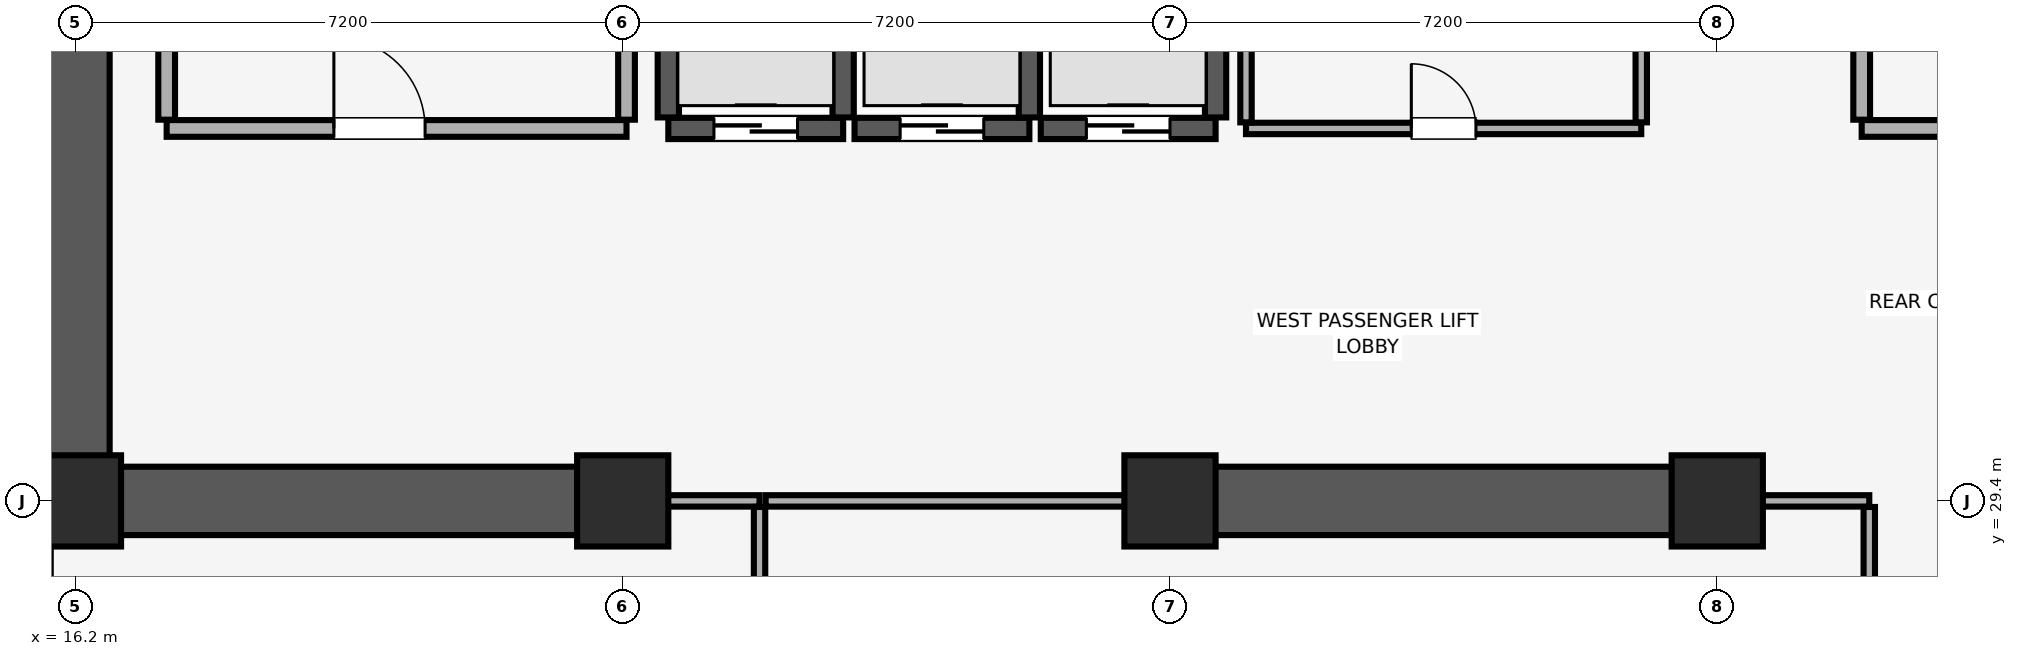
"""IFC4 building model, lengths in metres.
Left out: names, types, materials, properties, quantities, classifications, styles, units other than length and angle.
Written with IfcOpenShell. Run it as: python <this file> out.ifc"""

import sys

from ifc_helpers import new_model, si_unit, direction, frame, frame_2d, origin, origin_2d, place, context, subcontext, project, spatial, rectangle, extrude, element, fill, save


model = new_model("IFC4")
c1 = context("Model", 3, precision=1e-05, world=origin(), true_north=direction((0.0, 1.0)))
c2 = subcontext(c1, "Body", "Model", "MODEL_VIEW")
j1 = project(units=[si_unit("LENGTHUNIT", "METRE"), si_unit("PLANEANGLEUNIT", "RADIAN")], contexts=[c1])
p1 = place(None, origin())
s1 = spatial("IfcSite", under=j1, at=p1, CompositionType="ELEMENT")
p2 = place(p1, origin())
s2 = spatial("IfcBuilding", under=s1, at=p2, CompositionType="ELEMENT")
p3 = place(p2, frame((0.0, 0.0, 126.8)))
s3 = spatial("IfcBuildingStorey", under=s2, at=p3, CompositionType="ELEMENT", Elevation=126.8)
for number, where, z_axis, x_axis in (
    (1, (16.2, 29.4, 0.0), (0.0, 0.0, 1.0), (1.0, 0.0, 0.0)),
    (2, (23.4, 29.4, 0.0), (0.0, 0.0, 1.0), (1.0, 0.0, 0.0)),
    (3, (30.6, 29.4, 0.0), (0.0, 0.0, 1.0), (1.0, 0.0, 0.0)),
    (4, (37.8, 29.4, 0.0), (0.0, 0.0, 1.0), (1.0, 0.0, 0.0)),
):
    element("IfcColumn", number, at=place(p3, frame(where, z_axis=z_axis, x_axis=x_axis)), inside=s3, PredefinedType="COLUMN", context=c2, shape_type="SweptSolid", body=[
        extrude(rectangle(XDim=1.2, YDim=1.2, at=origin_2d()), origin(), (0.0, 0.0, 1.0), 3.51),
    ])
p4 = place(p3, frame((16.2, 29.4, 0.0), z_axis=(0.0, 0.0, 1.0), x_axis=(0.0, 1.0, 0.0)))
e5 = element("IfcWall", 5, at=p4, inside=s3, PredefinedType="SHEAR", context=c2, shape_type="SweptSolid", body=[
    extrude(rectangle(XDim=19.2, YDim=0.9, at=frame_2d((9.6, 0.0))), origin(), (0.0, 0.0, 1.0), 3.51),
])
p5 = place(p3, frame((16.655, 29.4, 0.0), z_axis=(0.0, 0.0, 1.0), x_axis=(1.0, 0.0, 0.0)))
e6 = element("IfcWall", 6, at=p5, inside=s3, PredefinedType="SHEAR", context=c2, shape_type="SweptSolid", body=[
    extrude(rectangle(XDim=6.945, YDim=0.9, at=frame_2d((3.473, 0.0))), origin(), (0.0, 0.0, 1.0), 3.51),
])
p6 = place(p3, frame((30.4, 29.4, 0.0), z_axis=(0.0, 0.0, 1.0), x_axis=(1.0, 0.0, 0.0)))
e7 = element("IfcWall", 7, at=p6, inside=s3, PredefinedType="SHEAR", context=c2, shape_type="SweptSolid", body=[
    extrude(rectangle(XDim=7.6, YDim=0.9, at=frame_2d((3.8, 0.0))), origin(), (0.0, 0.0, 1.0), 3.51),
])
p7 = place(p3, frame((24.0, 34.3, 0.0), z_axis=(0.0, 0.0, 1.0), x_axis=(1.0, 0.0, 0.0)))
e8 = element("IfcWall", 8, at=p7, inside=s3, PredefinedType="SHEAR", context=c2, shape_type="SweptSolid", body=[
    extrude(rectangle(XDim=2.3, YDim=0.28, at=frame_2d((1.15, 0.0))), origin(), (0.0, 0.0, 1.0), 3.51),
])
p8 = place(p7, frame((0.6, 0.0, 0.0)))
e9 = element("IfcOpeningElement", 9, at=p8, cuts=e8, PredefinedType="OPENING", context=c2, shape_type="SweptSolid", body=[
    extrude(rectangle(XDim=1.1, YDim=2.2, at=frame_2d((0.55, 1.1))), frame((0.0, 0.15, 0.0), z_axis=(0.0, -1.0, 0.0), x_axis=(1.0, 0.0, 0.0)), (0.0, 0.0, 1.0), 0.3),
])
for number, where, z_axis, x_axis in (
    (10, (24.0, 34.445, 0.0), (0.0, 0.0, 1.0), (0.0, 1.0, 0.0)),
    (11, (26.3, 34.445, 0.0), (0.0, 0.0, 1.0), (0.0, 1.0, 0.0)),
):
    element("IfcWall", number, at=place(p3, frame(where, z_axis=z_axis, x_axis=x_axis)), inside=s3, PredefinedType="SHEAR", context=c2, shape_type="SweptSolid", body=[
        extrude(rectangle(XDim=2.01, YDim=0.28, at=frame_2d((1.005, 0.0))), origin(), (0.0, 0.0, 1.0), 3.51),
    ])
p9 = place(p3, frame((26.45, 34.3, 0.0), z_axis=(0.0, 0.0, 1.0), x_axis=(1.0, 0.0, 0.0)))
e12 = element("IfcWall", 12, at=p9, inside=s3, PredefinedType="SHEAR", context=c2, shape_type="SweptSolid", body=[
    extrude(rectangle(XDim=2.3, YDim=0.28, at=frame_2d((1.15, 0.0))), origin(), (0.0, 0.0, 1.0), 3.51),
])
p10 = place(p9, frame((0.6, 0.0, 0.0)))
e13 = element("IfcOpeningElement", 13, at=p10, cuts=e12, PredefinedType="OPENING", context=c2, shape_type="SweptSolid", body=[
    extrude(rectangle(XDim=1.1, YDim=2.2, at=frame_2d((0.55, 1.1))), frame((0.0, 0.15, 0.0), z_axis=(0.0, -1.0, 0.0), x_axis=(1.0, 0.0, 0.0)), (0.0, 0.0, 1.0), 0.3),
])
p11 = place(p3, frame((28.75, 34.445, 0.0), z_axis=(0.0, 0.0, 1.0), x_axis=(0.0, 1.0, 0.0)))
e14 = element("IfcWall", 14, at=p11, inside=s3, PredefinedType="SHEAR", context=c2, shape_type="SweptSolid", body=[
    extrude(rectangle(XDim=2.01, YDim=0.28, at=frame_2d((1.005, 0.0))), origin(), (0.0, 0.0, 1.0), 3.51),
])
p12 = place(p3, frame((28.9, 34.3, 0.0), z_axis=(0.0, 0.0, 1.0), x_axis=(1.0, 0.0, 0.0)))
e15 = element("IfcWall", 15, at=p12, inside=s3, PredefinedType="SHEAR", context=c2, shape_type="SweptSolid", body=[
    extrude(rectangle(XDim=2.3, YDim=0.28, at=frame_2d((1.15, 0.0))), origin(), (0.0, 0.0, 1.0), 3.51),
])
p13 = place(p12, frame((0.6, 0.0, 0.0)))
e16 = element("IfcOpeningElement", 16, at=p13, cuts=e15, PredefinedType="OPENING", context=c2, shape_type="SweptSolid", body=[
    extrude(rectangle(XDim=1.1, YDim=2.2, at=frame_2d((0.55, 1.1))), frame((0.0, 0.15, 0.0), z_axis=(0.0, -1.0, 0.0), x_axis=(1.0, 0.0, 0.0)), (0.0, 0.0, 1.0), 0.3),
])
p14 = place(p3, frame((31.2, 34.445, 0.0), z_axis=(0.0, 0.0, 1.0), x_axis=(0.0, 1.0, 0.0)))
e17 = element("IfcWall", 17, at=p14, inside=s3, PredefinedType="SHEAR", context=c2, shape_type="SweptSolid", body=[
    extrude(rectangle(XDim=2.01, YDim=0.28, at=frame_2d((1.005, 0.0))), origin(), (0.0, 0.0, 1.0), 3.51),
])
p15 = place(p3, frame((17.4, 34.3, 0.0), z_axis=(0.0, 0.0, 1.0), x_axis=(1.0, 0.0, 0.0)))
e18 = element("IfcWall", 18, at=p15, inside=s3, PredefinedType="PARTITIONING", context=c2, shape_type="SweptSolid", body=[
    extrude(rectangle(XDim=6.05, YDim=0.22, at=frame_2d((3.025, 0.0))), origin(), (0.0, 0.0, 1.0), 3.51),
])
p16 = place(p15, frame((2.2, 0.0, 0.0)))
e19 = element("IfcOpeningElement", 19, at=p16, cuts=e18, PredefinedType="OPENING", context=c2, shape_type="SweptSolid", body=[
    extrude(rectangle(XDim=1.2, YDim=2.15, at=frame_2d((0.6, 1.075))), frame((0.0, 0.12, 0.0), z_axis=(0.0, -1.0, 0.0), x_axis=(1.0, 0.0, 0.0)), (0.0, 0.0, 1.0), 0.24),
])
p17 = place(p3, frame((17.4, 34.415, 0.0), z_axis=(0.0, 0.0, 1.0), x_axis=(0.0, 1.0, 0.0)))
e20 = element("IfcWall", 20, at=p17, inside=s3, PredefinedType="PARTITIONING", context=c2, shape_type="SweptSolid", body=[
    extrude(rectangle(XDim=5.43, YDim=0.22, at=frame_2d((2.715, 0.0))), origin(), (0.0, 0.0, 1.0), 3.51),
])
p18 = place(p3, frame((23.45, 34.415, 0.0), z_axis=(0.0, 0.0, 1.0), x_axis=(0.0, 1.0, 0.0)))
e21 = element("IfcWall", 21, at=p18, inside=s3, PredefinedType="PARTITIONING", context=c2, shape_type="SweptSolid", body=[
    extrude(rectangle(XDim=5.64, YDim=0.22, at=frame_2d((2.82, 0.0))), origin(), (0.0, 0.0, 1.0), 3.51),
])
p19 = place(p3, frame((39.7, 34.3, 0.0), z_axis=(0.0, 0.0, 1.0), x_axis=(1.0, 0.0, 0.0)))
e22 = element("IfcWall", 22, at=p19, inside=s3, PredefinedType="PARTITIONING", context=c2, shape_type="SweptSolid", body=[
    extrude(rectangle(XDim=4.6, YDim=0.22, at=frame_2d((2.3, 0.0))), origin(), (0.0, 0.0, 1.0), 3.51),
])
p20 = place(p19, frame((1.7, 0.0, 0.0)))
e23 = element("IfcOpeningElement", 23, at=p20, cuts=e22, PredefinedType="OPENING", context=c2, shape_type="SweptSolid", body=[
    extrude(rectangle(XDim=1.2, YDim=2.15, at=frame_2d((0.6, 1.075))), frame((0.0, 0.12, 0.0), z_axis=(0.0, -1.0, 0.0), x_axis=(1.0, 0.0, 0.0)), (0.0, 0.0, 1.0), 0.24),
])
p21 = place(p3, frame((39.7, 34.415, 0.0), z_axis=(0.0, 0.0, 1.0), x_axis=(0.0, 1.0, 0.0)))
e24 = element("IfcWall", 24, at=p21, inside=s3, PredefinedType="PARTITIONING", context=c2, shape_type="SweptSolid", body=[
    extrude(rectangle(XDim=5.785, YDim=0.22, at=frame_2d((2.893, 0.0))), origin(), (0.0, 0.0, 1.0), 3.51),
])
p22 = place(p3, frame((31.6, 34.3, 0.0), z_axis=(0.0, 0.0, 1.0), x_axis=(1.0, 0.0, 0.0)))
e25 = element("IfcWall", 25, at=p22, inside=s3, PredefinedType="PARTITIONING", context=c2, shape_type="SweptSolid", body=[
    extrude(rectangle(XDim=5.2, YDim=0.15, at=frame_2d((2.6, 0.0))), origin(), (0.0, 0.0, 1.0), 3.51),
])
p23 = place(p22, frame((2.175, 0.0, 0.0)))
e26 = element("IfcOpeningElement", 26, at=p23, cuts=e25, PredefinedType="OPENING", context=c2, shape_type="SweptSolid", body=[
    extrude(rectangle(XDim=0.85, YDim=2.1, at=frame_2d((0.425, 1.05))), frame((0.0, 0.085, 0.0), z_axis=(0.0, -1.0, 0.0), x_axis=(1.0, 0.0, 0.0)), (0.0, 0.0, 1.0), 0.17),
])
for number, where, z_axis, x_axis in (
    (27, (31.6, 34.38, 0.0), (0.0, 0.0, 1.0), (0.0, 1.0, 0.0)),
    (28, (36.8, 34.38, 0.0), (0.0, 0.0, 1.0), (0.0, 1.0, 0.0)),
):
    element("IfcWall", number, at=place(p3, frame(where, z_axis=z_axis, x_axis=x_axis)), inside=s3, PredefinedType="PARTITIONING", context=c2, shape_type="SweptSolid", body=[
        extrude(rectangle(XDim=4.94, YDim=0.15, at=frame_2d((2.47, 0.0))), origin(), (0.0, 0.0, 1.0), 3.51),
    ])
p24 = place(p3, frame((23.61, 29.4, 0.0), z_axis=(0.0, 0.0, 1.0), x_axis=(1.0, 0.0, 0.0)))
e29 = element("IfcWall", 29, at=p24, inside=s3, PredefinedType="PARTITIONING", context=c2, shape_type="SweptSolid", body=[
    extrude(rectangle(XDim=1.59, YDim=0.15, at=frame_2d((0.795, 0.0))), origin(), (0.0, 0.0, 1.0), 2.41),
])
p25 = place(p3, frame((25.2, 26.73, 0.0), z_axis=(0.0, 0.0, 1.0), x_axis=(0.0, 1.0, 0.0)))
e30 = element("IfcWall", 30, at=p25, inside=s3, PredefinedType="PARTITIONING", context=c2, shape_type="SweptSolid", body=[
    extrude(rectangle(XDim=2.59, YDim=0.15, at=frame_2d((1.295, 0.0))), origin(), (0.0, 0.0, 1.0), 3.51),
])
p26 = place(p3, frame((25.28, 29.4, 0.0), z_axis=(0.0, 0.0, 1.0), x_axis=(1.0, 0.0, 0.0)))
e31 = element("IfcWall", 31, at=p26, inside=s3, PredefinedType="PARTITIONING", context=c2, shape_type="SweptSolid", body=[
    extrude(rectangle(XDim=5.11, YDim=0.15, at=frame_2d((2.555, 0.0))), origin(), (0.0, 0.0, 1.0), 2.41),
])
p27 = place(p3, frame((38.01, 29.4, 0.0), z_axis=(0.0, 0.0, 1.0), x_axis=(1.0, 0.0, 0.0)))
e32 = element("IfcWall", 32, at=p27, inside=s3, PredefinedType="PARTITIONING", context=c2, shape_type="SweptSolid", body=[
    extrude(rectangle(XDim=1.79, YDim=0.15, at=frame_2d((0.895, 0.0))), origin(), (0.0, 0.0, 1.0), 2.41),
])
p28 = place(p3, frame((39.8, 26.73, 0.0), z_axis=(0.0, 0.0, 1.0), x_axis=(0.0, 1.0, 0.0)))
e33 = element("IfcWall", 33, at=p28, inside=s3, PredefinedType="PARTITIONING", context=c2, shape_type="SweptSolid", body=[
    extrude(rectangle(XDim=2.59, YDim=0.15, at=frame_2d((1.295, 0.0))), origin(), (0.0, 0.0, 1.0), 3.51),
])
p29 = place(p8, origin())
e34 = element("IfcDoor", 34, at=p29, inside=s3, OperationType="DOUBLE_DOOR_SLIDING", PredefinedType="DOOR", context=c2, shape_type="SweptSolid", body=[
    extrude(rectangle(XDim=1.1, YDim=2.2, at=frame_2d((0.55, 1.1))), frame((0.0, 0.025, 0.0), z_axis=(0.0, -1.0, 0.0), x_axis=(1.0, 0.0, 0.0)), (0.0, 0.0, 1.0), 0.05),
])
fill(e9, e34)
p30 = place(p10, origin())
e35 = element("IfcDoor", 35, at=p30, inside=s3, OperationType="DOUBLE_DOOR_SLIDING", PredefinedType="DOOR", context=c2, shape_type="SweptSolid", body=[
    extrude(rectangle(XDim=1.1, YDim=2.2, at=frame_2d((0.55, 1.1))), frame((0.0, 0.025, 0.0), z_axis=(0.0, -1.0, 0.0), x_axis=(1.0, 0.0, 0.0)), (0.0, 0.0, 1.0), 0.05),
])
fill(e13, e35)
p31 = place(p13, origin())
e36 = element("IfcDoor", 36, at=p31, inside=s3, OperationType="DOUBLE_DOOR_SLIDING", PredefinedType="DOOR", context=c2, shape_type="SweptSolid", body=[
    extrude(rectangle(XDim=1.1, YDim=2.2, at=frame_2d((0.55, 1.1))), frame((0.0, 0.025, 0.0), z_axis=(0.0, -1.0, 0.0), x_axis=(1.0, 0.0, 0.0)), (0.0, 0.0, 1.0), 0.05),
])
fill(e16, e36)
p32 = place(p16, origin())
e37 = element("IfcDoor", 37, at=p32, inside=s3, OperationType="SINGLE_SWING_LEFT", PredefinedType="DOOR", context=c2, shape_type="SweptSolid", body=[
    extrude(rectangle(XDim=1.2, YDim=2.15, at=frame_2d((0.6, 1.075))), frame((0.0, 0.025, 0.0), z_axis=(0.0, -1.0, 0.0), x_axis=(1.0, 0.0, 0.0)), (0.0, 0.0, 1.0), 0.05),
])
fill(e19, e37)
p33 = place(p23, origin())
e38 = element("IfcDoor", 38, at=p33, inside=s3, OperationType="SINGLE_SWING_LEFT", PredefinedType="DOOR", context=c2, shape_type="SweptSolid", body=[
    extrude(rectangle(XDim=0.85, YDim=2.1, at=frame_2d((0.425, 1.05))), frame((0.0, 0.025, 0.0), z_axis=(0.0, -1.0, 0.0), x_axis=(1.0, 0.0, 0.0)), (0.0, 0.0, 1.0), 0.05),
])
fill(e26, e38)
save(model, sys.argv[1])
